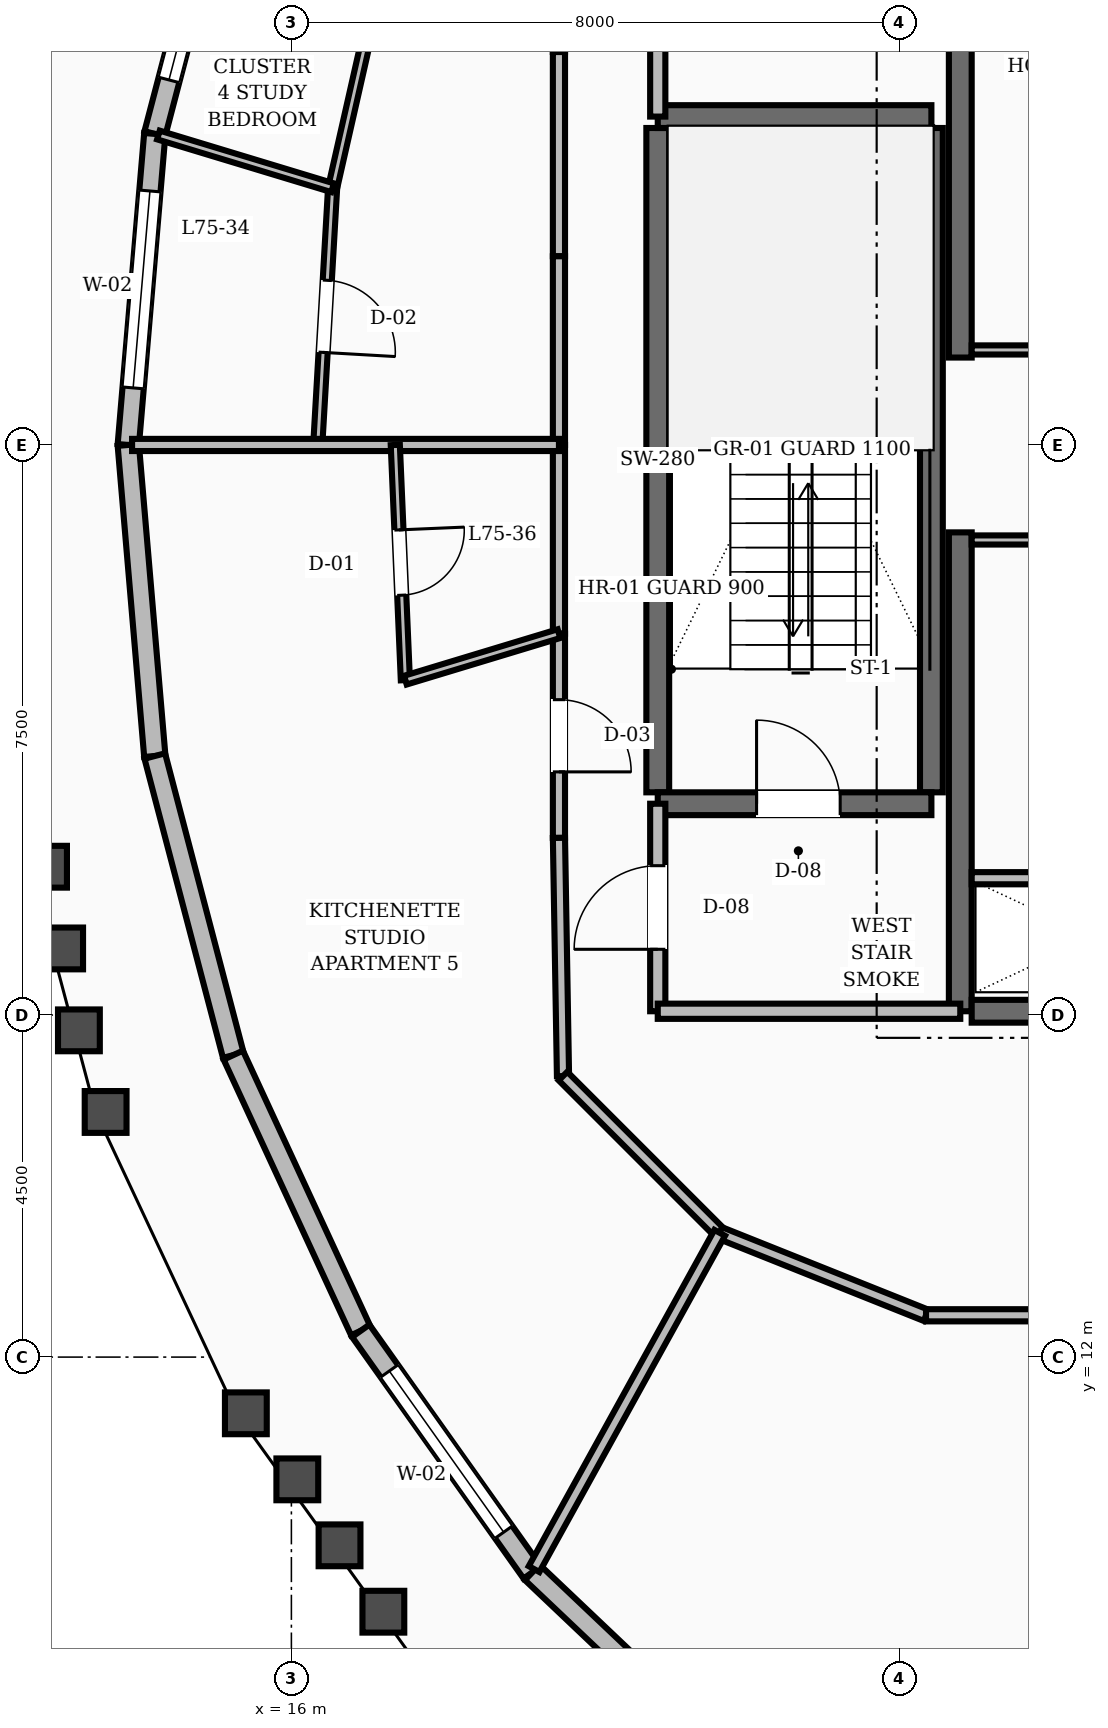
"""IFC4 building model, lengths in metres.
Left out: names, types, materials, properties, quantities, classifications, styles, units other than length and angle.
Written with IfcOpenShell. Run it as: python <this file> out.ifc"""

import sys

from ifc_helpers import new_model, si_unit, direction, frame, frame_2d, origin, place, context, subcontext, project, spatial, rectangle, extrude, element, fill, save


model = new_model("IFC4")
c1 = context("Model", 3, precision=1e-05, world=origin(), true_north=direction((0.0, 1.0)))
c2 = subcontext(c1, "Body", "Model", "MODEL_VIEW")
j1 = project(units=[si_unit("LENGTHUNIT", "METRE"), si_unit("PLANEANGLEUNIT", "RADIAN")], contexts=[c1])
p1 = place(None, origin())
s1 = spatial("IfcSite", under=j1, at=p1, CompositionType="ELEMENT")
p2 = place(p1, origin())
s2 = spatial("IfcBuilding", under=s1, at=p2, CompositionType="ELEMENT")
p3 = place(p2, frame((0.0, 0.0, 286.8)))
s3 = spatial("IfcBuildingStorey", under=s2, at=p3, CompositionType="ELEMENT", Elevation=286.8)
for number, where, z_axis, x_axis in (
    (1, (24.8, 16.55, 0.0), (0.0, 0.0, 1.0), (0.0, 1.0, 0.0)),
    (2, (24.8, 25.15, 0.0), (0.0, 0.0, 1.0), (0.0, 1.0, 0.0)),
):
    element("IfcWall", number, at=place(p3, frame(where, z_axis=z_axis, x_axis=x_axis)), inside=s3, PredefinedType="SHEAR", context=c2, shape_type="SweptSolid", body=[
        extrude(rectangle(XDim=6.3, YDim=0.3, at=frame_2d((3.15, 0.0))), origin(), (0.0, 0.0, 1.0), 3.6),
    ])
p4 = place(p3, frame((24.95, 16.55, 0.0), z_axis=(0.0, 0.0, 1.0), x_axis=(1.0, 0.0, 0.0)))
e3 = element("IfcWall", 3, at=p4, inside=s3, PredefinedType="SHEAR", context=c2, shape_type="SweptSolid", body=[
    extrude(rectangle(XDim=3.25, YDim=0.3, at=frame_2d((1.625, 0.0))), origin(), (0.0, 0.0, 1.0), 3.6),
])
for number, where, z_axis, x_axis in (
    (4, (20.82, 19.43, 0.0), (0.0, 0.0, 1.0), (0.0, 1.0, 0.0)),
    (5, (24.42, 19.43, 0.0), (0.0, 0.0, 1.0), (0.0, 1.0, 0.0)),
):
    element("IfcWall", number, at=place(p3, frame(where, z_axis=z_axis, x_axis=x_axis)), inside=s3, PredefinedType="SHEAR", context=c2, shape_type="SweptSolid", body=[
        extrude(rectangle(XDim=8.74, YDim=0.3, at=frame_2d((4.37, 0.0))), origin(), (0.0, 0.0, 1.0), 3.6),
    ])
p5 = place(p3, frame((20.82, 19.28, 0.0), z_axis=(0.0, 0.0, 1.0), x_axis=(1.0, 0.0, 0.0)))
e6 = element("IfcWall", 6, at=p5, inside=s3, PredefinedType="SHEAR", context=c2, shape_type="SweptSolid", body=[
    extrude(rectangle(XDim=3.6, YDim=0.3, at=frame_2d((1.8, 0.0))), origin(), (0.0, 0.0, 1.0), 3.6),
])
p6 = place(p5, frame((1.3, 0.0, 0.0)))
e7 = element("IfcOpeningElement", 7, at=p6, cuts=e6, PredefinedType="OPENING", context=c2, shape_type="SweptSolid", body=[
    extrude(rectangle(XDim=1.1, YDim=2.1, at=frame_2d((0.55, 1.05))), frame((0.0, 0.16, 0.0), z_axis=(0.0, -1.0, 0.0), x_axis=(1.0, 0.0, 0.0)), (0.0, 0.0, 1.0), 0.32),
])
p7 = place(p3, frame((20.82, 28.32, 0.0), z_axis=(0.0, 0.0, 1.0), x_axis=(1.0, 0.0, 0.0)))
e8 = element("IfcWall", 8, at=p7, inside=s3, PredefinedType="SHEAR", context=c2, shape_type="SweptSolid", body=[
    extrude(rectangle(XDim=3.6, YDim=0.3, at=frame_2d((1.8, 0.0))), origin(), (0.0, 0.0, 1.0), 3.6),
])
p8 = place(p3, frame((15.235, 32.027, 0.0), z_axis=(0.0, 0.0, 1.0), x_axis=(-0.253787245117, -0.967260065451, 0.0)))
e9 = element("IfcWall", 9, at=p8, inside=s3, PredefinedType="STANDARD", context=c2, shape_type="SweptSolid", body=[
    extrude(rectangle(XDim=4.068, YDim=0.28, at=frame_2d((2.034, 0.0))), origin(), (0.0, 0.0, 1.0), 2.88),
])
p9 = place(p8, frame((0.734, 0.0, 0.8)))
e10 = element("IfcOpeningElement", 10, at=p9, cuts=e9, PredefinedType="OPENING", context=c2, shape_type="SweptSolid", body=[
    extrude(rectangle(XDim=2.6, YDim=1.65, at=frame_2d((1.3, 0.825))), frame((0.0, 0.15, 0.0), z_axis=(0.0, -1.0, 0.0), x_axis=(1.0, 0.0, 0.0)), (0.0, 0.0, 1.0), 0.3),
])
p10 = place(p3, frame((14.203, 28.092, 0.0), z_axis=(0.0, 0.0, 1.0), x_axis=(-0.084944229557, -0.996385707377, 0.0)))
e11 = element("IfcWall", 11, at=p10, inside=s3, PredefinedType="STANDARD", context=c2, shape_type="SweptSolid", body=[
    extrude(rectangle(XDim=4.107, YDim=0.28, at=frame_2d((2.054, 0.0))), origin(), (0.0, 0.0, 1.0), 2.88),
])
p11 = place(p10, frame((0.754, 0.0, 0.8)))
e12 = element("IfcOpeningElement", 12, at=p11, cuts=e11, PredefinedType="OPENING", context=c2, shape_type="SweptSolid", body=[
    extrude(rectangle(XDim=2.6, YDim=1.65, at=frame_2d((1.3, 0.825))), frame((0.0, 0.15, 0.0), z_axis=(0.0, -1.0, 0.0), x_axis=(1.0, 0.0, 0.0)), (0.0, 0.0, 1.0), 0.3),
])
p12 = place(p3, frame((13.854, 24.0, 0.0), z_axis=(0.0, 0.0, 1.0), x_axis=(0.084944229557, -0.996385707377, 0.0)))
e13 = element("IfcWall", 13, at=p12, inside=s3, PredefinedType="STANDARD", context=c2, shape_type="SweptSolid", body=[
    extrude(rectangle(XDim=4.107, YDim=0.28, at=frame_2d((2.054, 0.0))), origin(), (0.0, 0.0, 1.0), 2.88),
])
p13 = place(p3, frame((14.203, 19.908, 0.0), z_axis=(0.0, 0.0, 1.0), x_axis=(0.253787245117, -0.967260065451, 0.0)))
e14 = element("IfcWall", 14, at=p13, inside=s3, PredefinedType="STANDARD", context=c2, shape_type="SweptSolid", body=[
    extrude(rectangle(XDim=4.068, YDim=0.28, at=frame_2d((2.034, 0.0))), origin(), (0.0, 0.0, 1.0), 2.88),
])
p14 = place(p3, frame((15.235, 15.973, 0.0), z_axis=(0.0, 0.0, 1.0), x_axis=(0.41967808517, -0.90767301647, 0.0)))
e15 = element("IfcWall", 15, at=p14, inside=s3, PredefinedType="STANDARD", context=c2, shape_type="SweptSolid", body=[
    extrude(rectangle(XDim=3.995, YDim=0.28, at=frame_2d((1.998, 0.0))), origin(), (0.0, 0.0, 1.0), 2.88),
])
p15 = place(p3, frame((16.912, 12.346, 0.0), z_axis=(0.0, 0.0, 1.0), x_axis=(0.578913591695, -0.815388897, 0.0)))
e16 = element("IfcWall", 16, at=p15, inside=s3, PredefinedType="STANDARD", context=c2, shape_type="SweptSolid", body=[
    extrude(rectangle(XDim=3.898, YDim=0.28, at=frame_2d((1.949, 0.0))), origin(), (0.0, 0.0, 1.0), 2.88),
])
p16 = place(p15, frame((0.649, 0.0, 0.8)))
e17 = element("IfcOpeningElement", 17, at=p16, cuts=e16, PredefinedType="OPENING", context=c2, shape_type="SweptSolid", body=[
    extrude(rectangle(XDim=2.6, YDim=1.65, at=frame_2d((1.3, 0.825))), frame((0.0, 0.15, 0.0), z_axis=(0.0, -1.0, 0.0), x_axis=(1.0, 0.0, 0.0)), (0.0, 0.0, 1.0), 0.3),
])
p17 = place(p3, frame((19.169, 9.167, 0.0), z_axis=(0.0, 0.0, 1.0), x_axis=(0.725476892889, -0.688246524063, 0.0)))
e18 = element("IfcWall", 18, at=p17, inside=s3, PredefinedType="STANDARD", context=c2, shape_type="SweptSolid", body=[
    extrude(rectangle(XDim=3.79, YDim=0.28, at=frame_2d((1.895, 0.0))), origin(), (0.0, 0.0, 1.0), 2.88),
])
p18 = place(p3, frame((20.82, 16.55, 0.0), z_axis=(0.0, 0.0, 1.0), x_axis=(0.0, 1.0, 0.0)))
e19 = element("IfcWall", 19, at=p18, inside=s3, PredefinedType="SOLIDWALL", context=c2, shape_type="SweptSolid", body=[
    extrude(rectangle(XDim=2.73, YDim=0.2, at=frame_2d((1.365, 0.0))), origin(), (0.0, 0.0, 1.0), 2.87),
])
p19 = place(p18, frame((0.815, 0.0, 0.0)))
e20 = element("IfcOpeningElement", 20, at=p19, cuts=e19, PredefinedType="OPENING", context=c2, shape_type="SweptSolid", body=[
    extrude(rectangle(XDim=1.1, YDim=2.1, at=frame_2d((0.55, 1.05))), frame((0.0, 0.11, 0.0), z_axis=(0.0, -1.0, 0.0), x_axis=(1.0, 0.0, 0.0)), (0.0, 0.0, 1.0), 0.22),
])
p20 = place(p3, frame((20.82, 16.55, 0.0), z_axis=(0.0, 0.0, 1.0), x_axis=(1.0, 0.0, 0.0)))
e21 = element("IfcWall", 21, at=p20, inside=s3, PredefinedType="SOLIDWALL", context=c2, shape_type="SweptSolid", body=[
    extrude(rectangle(XDim=3.98, YDim=0.2, at=frame_2d((1.99, 0.0))), origin(), (0.0, 0.0, 1.0), 2.87),
])
p21 = place(p3, frame((20.82, 28.32, 0.0), z_axis=(0.0, 0.0, 1.0), x_axis=(0.0, 1.0, 0.0)))
e22 = element("IfcWall", 22, at=p21, inside=s3, PredefinedType="SOLIDWALL", context=c2, shape_type="SweptSolid", body=[
    extrude(rectangle(XDim=3.13, YDim=0.2, at=frame_2d((1.565, 0.0))), origin(), (0.0, 0.0, 1.0), 2.87),
])
p22 = place(p21, frame((1.09, 0.0, 0.0)))
e23 = element("IfcOpeningElement", 23, at=p22, cuts=e22, PredefinedType="OPENING", context=c2, shape_type="SweptSolid", body=[
    extrude(rectangle(XDim=0.95, YDim=2.1, at=frame_2d((0.475, 1.05))), frame((0.0, 0.11, 0.0), z_axis=(0.0, -1.0, 0.0), x_axis=(1.0, 0.0, 0.0)), (0.0, 0.0, 1.0), 0.22),
])
p23 = place(p3, frame((24.95, 18.3, 0.0), z_axis=(0.0, 0.0, 1.0), x_axis=(1.0, 0.0, 0.0)))
e24 = element("IfcWall", 24, at=p23, inside=s3, PredefinedType="SOLIDWALL", context=c2, shape_type="SweptSolid", body=[
    extrude(rectangle(XDim=3.2, YDim=0.16, at=frame_2d((1.6, 0.0))), origin(), (0.0, 0.0, 1.0), 2.87),
])
p24 = place(p3, frame((24.95, 25.25, 0.0), z_axis=(0.0, 0.0, 1.0), x_axis=(1.0, 0.0, 0.0)))
e25 = element("IfcWall", 25, at=p24, inside=s3, PredefinedType="PARTITIONING", context=c2, shape_type="SweptSolid", body=[
    extrude(rectangle(XDim=3.2, YDim=0.12, at=frame_2d((1.6, 0.0))), origin(), (0.0, 0.0, 1.0), 2.87),
])
p25 = place(p24, frame((1.125, 0.0, 0.0)))
e26 = element("IfcOpeningElement", 26, at=p25, cuts=e25, PredefinedType="OPENING", context=c2, shape_type="SweptSolid", body=[
    extrude(rectangle(XDim=0.95, YDim=2.1, at=frame_2d((0.475, 1.05))), frame((0.0, 0.07, 0.0), z_axis=(0.0, -1.0, 0.0), x_axis=(1.0, 0.0, 0.0)), (0.0, 0.0, 1.0), 0.14),
])
p26 = place(p3, frame((24.95, 22.75, 0.0), z_axis=(0.0, 0.0, 1.0), x_axis=(1.0, 0.0, 0.0)))
e27 = element("IfcWall", 27, at=p26, inside=s3, PredefinedType="PARTITIONING", context=c2, shape_type="SweptSolid", body=[
    extrude(rectangle(XDim=3.2, YDim=0.12, at=frame_2d((1.6, 0.0))), origin(), (0.0, 0.0, 1.0), 2.87),
])
p27 = place(p26, frame((1.125, 0.0, 0.0)))
e28 = element("IfcOpeningElement", 28, at=p27, cuts=e27, PredefinedType="OPENING", context=c2, shape_type="SweptSolid", body=[
    extrude(rectangle(XDim=0.95, YDim=2.1, at=frame_2d((0.475, 1.05))), frame((0.0, 0.07, 0.0), z_axis=(0.0, -1.0, 0.0), x_axis=(1.0, 0.0, 0.0)), (0.0, 0.0, 1.0), 0.14),
])
p28 = place(p3, frame((19.573, 32.303, 0.0), z_axis=(0.0, 0.0, 1.0), x_axis=(-0.016981035134, -0.999855811828, 0.0)))
e29 = element("IfcWall", 29, at=p28, inside=s3, PredefinedType="SOLIDWALL", context=c2, shape_type="SweptSolid", body=[
    extrude(rectangle(XDim=3.134, YDim=0.16, at=frame_2d((1.567, 0.0))), origin(), (0.0, 0.0, 1.0), 2.87),
])
p29 = place(p3, frame((19.52, 29.169, 0.0), z_axis=(0.0, 0.0, 1.0), x_axis=(0.0, -1.0, 0.0)))
e30 = element("IfcWall", 30, at=p29, inside=s3, PredefinedType="SOLIDWALL", context=c2, shape_type="SweptSolid", body=[
    extrude(rectangle(XDim=2.687, YDim=0.16, at=frame_2d((1.344, 0.0))), origin(), (0.0, 0.0, 1.0), 2.87),
])
for number, where, z_axis, x_axis in (
    (31, (19.52, 26.482, 0.0), (0.0, 0.0, 1.0), (0.0, -1.0, 0.0)),
    (32, (19.52, 24.0, 0.0), (0.0, 0.0, 1.0), (0.0, -1.0, 0.0)),
):
    element("IfcWall", number, at=place(p3, frame(where, z_axis=z_axis, x_axis=x_axis)), inside=s3, PredefinedType="SOLIDWALL", context=c2, shape_type="SweptSolid", body=[
        extrude(rectangle(XDim=2.482, YDim=0.16, at=frame_2d((1.241, 0.0))), origin(), (0.0, 0.0, 1.0), 2.87),
    ])
p30 = place(p3, frame((19.52, 21.518, 0.0), z_axis=(0.0, 0.0, 1.0), x_axis=(0.0, -1.0, 0.0)))
e33 = element("IfcWall", 33, at=p30, inside=s3, PredefinedType="SOLIDWALL", context=c2, shape_type="SweptSolid", body=[
    extrude(rectangle(XDim=2.687, YDim=0.16, at=frame_2d((1.344, 0.0))), origin(), (0.0, 0.0, 1.0), 2.87),
])
p31 = place(p30, frame((0.868, 0.0, 0.0)))
e34 = element("IfcOpeningElement", 34, at=p31, cuts=e33, PredefinedType="OPENING", context=c2, shape_type="SweptSolid", body=[
    extrude(rectangle(XDim=0.95, YDim=2.1, at=frame_2d((0.475, 1.05))), frame((0.0, 0.09, 0.0), z_axis=(0.0, -1.0, 0.0), x_axis=(1.0, 0.0, 0.0)), (0.0, 0.0, 1.0), 0.18),
])
p32 = place(p3, frame((19.52, 18.831, 0.0), z_axis=(0.0, 0.0, 1.0), x_axis=(0.016981035134, -0.999855811828, 0.0)))
e35 = element("IfcWall", 35, at=p32, inside=s3, PredefinedType="SOLIDWALL", context=c2, shape_type="SweptSolid", body=[
    extrude(rectangle(XDim=3.134, YDim=0.16, at=frame_2d((1.567, 0.0))), origin(), (0.0, 0.0, 1.0), 2.87),
])
p33 = place(p3, frame((19.573, 15.697, 0.0), z_axis=(0.0, 0.0, 1.0), x_axis=(0.707106781187, -0.707106781187, 0.0)))
e36 = element("IfcWall", 36, at=p33, inside=s3, PredefinedType="SOLIDWALL", context=c2, shape_type="SweptSolid", body=[
    extrude(rectangle(XDim=2.916, YDim=0.16, at=frame_2d((1.458, 0.0))), origin(), (0.0, 0.0, 1.0), 2.87),
])
p34 = place(p3, frame((21.635, 13.635, 0.0), z_axis=(0.0, 0.0, 1.0), x_axis=(0.92856882165, -0.371160266542, 0.0)))
e37 = element("IfcWall", 37, at=p34, inside=s3, PredefinedType="SOLIDWALL", context=c2, shape_type="SweptSolid", body=[
    extrude(rectangle(XDim=2.923, YDim=0.16, at=frame_2d((1.461, 0.0))), origin(), (0.0, 0.0, 1.0), 2.87),
])
p35 = place(p3, frame((24.349, 12.55, 0.0), z_axis=(0.0, 0.0, 1.0), x_axis=(1.0, 0.0, 0.0)))
e38 = element("IfcWall", 38, at=p35, inside=s3, PredefinedType="SOLIDWALL", context=c2, shape_type="SweptSolid", body=[
    extrude(rectangle(XDim=2.908, YDim=0.16, at=frame_2d((1.454, 0.0))), origin(), (0.0, 0.0, 1.0), 2.87),
])
p36 = place(p3, frame((18.083, 34.18, 0.0), z_axis=(0.0, 0.0, 1.0), x_axis=(-0.22107591462, -0.975256602118, 0.0)))
e39 = element("IfcWall", 39, at=p36, inside=s3, PredefinedType="PARTITIONING", context=c2, shape_type="SweptSolid", body=[
    extrude(rectangle(XDim=6.968, YDim=0.12, at=frame_2d((3.484, 0.0))), origin(), (0.0, 0.0, 1.0), 2.87),
])
p37 = place(p36, frame((3.009, 0.0, 0.0)))
e40 = element("IfcOpeningElement", 40, at=p37, cuts=e39, PredefinedType="OPENING", context=c2, shape_type="SweptSolid", body=[
    extrude(rectangle(XDim=0.95, YDim=2.1, at=frame_2d((0.475, 1.05))), frame((0.0, 0.07, 0.0), z_axis=(0.0, -1.0, 0.0), x_axis=(1.0, 0.0, 0.0)), (0.0, 0.0, 1.0), 0.14),
])
p38 = place(p3, frame((16.542, 27.384, 0.0), z_axis=(0.0, 0.0, 1.0), x_axis=(-0.057624147088, -0.998338348293, 0.0)))
e41 = element("IfcWall", 41, at=p38, inside=s3, PredefinedType="PARTITIONING", context=c2, shape_type="SweptSolid", body=[
    extrude(rectangle(XDim=3.389, YDim=0.12, at=frame_2d((1.695, 0.0))), origin(), (0.0, 0.0, 1.0), 2.87),
])
p39 = place(p38, frame((1.22, 0.0, 0.0)))
e42 = element("IfcOpeningElement", 42, at=p39, cuts=e41, PredefinedType="OPENING", context=c2, shape_type="SweptSolid", body=[
    extrude(rectangle(XDim=0.95, YDim=2.1, at=frame_2d((0.475, 1.05))), frame((0.0, 0.07, 0.0), z_axis=(0.0, -1.0, 0.0), x_axis=(1.0, 0.0, 0.0)), (0.0, 0.0, 1.0), 0.14),
])
p40 = place(p3, frame((16.542, 27.384, 0.0), z_axis=(0.0, 0.0, 1.0), x_axis=(-0.957068126057, 0.289863074718, 0.0)))
e43 = element("IfcWall", 43, at=p40, inside=s3, PredefinedType="PARTITIONING", context=c2, shape_type="SweptSolid", body=[
    extrude(rectangle(XDim=2.395, YDim=0.12, at=frame_2d((1.197, 0.0))), origin(), (0.0, 0.0, 1.0), 2.87),
])
p41 = place(p3, frame((19.52, 24.0, 0.0), z_axis=(0.0, 0.0, 1.0), x_axis=(-1.0, 0.0, 0.0)))
e44 = element("IfcWall", 44, at=p41, inside=s3, PredefinedType="SOLIDWALL", context=c2, shape_type="SweptSolid", body=[
    extrude(rectangle(XDim=5.616, YDim=0.16, at=frame_2d((2.808, 0.0))), origin(), (0.0, 0.0, 1.0), 2.87),
])
p42 = place(p3, frame((17.367, 24.0, 0.0), z_axis=(0.0, 0.0, 1.0), x_axis=(0.042804349557, -0.999083473819, 0.0)))
e45 = element("IfcWall", 45, at=p42, inside=s3, PredefinedType="PARTITIONING", context=c2, shape_type="SweptSolid", body=[
    extrude(rectangle(XDim=3.097, YDim=0.12, at=frame_2d((1.549, 0.0))), origin(), (0.0, 0.0, 1.0), 2.87),
])
p43 = place(p42, frame((1.118, 0.0, 0.0)))
e46 = element("IfcOpeningElement", 46, at=p43, cuts=e45, PredefinedType="OPENING", context=c2, shape_type="SweptSolid", body=[
    extrude(rectangle(XDim=0.86, YDim=2.1, at=frame_2d((0.43, 1.05))), frame((0.0, 0.07, 0.0), z_axis=(0.0, -1.0, 0.0), x_axis=(1.0, 0.0, 0.0)), (0.0, 0.0, 1.0), 0.14),
])
p44 = place(p3, frame((19.52, 21.518, 0.0), z_axis=(0.0, 0.0, 1.0), x_axis=(-0.957084686855, -0.289808388746, 0.0)))
e47 = element("IfcWall", 47, at=p44, inside=s3, PredefinedType="PARTITIONING", context=c2, shape_type="SweptSolid", body=[
    extrude(rectangle(XDim=2.111, YDim=0.12, at=frame_2d((1.056, 0.0))), origin(), (0.0, 0.0, 1.0), 2.87),
])
p45 = place(p3, frame((21.635, 13.635, 0.0), z_axis=(0.0, 0.0, 1.0), x_axis=(-0.483253595125, -0.875480418284, 0.0)))
e48 = element("IfcWall", 48, at=p45, inside=s3, PredefinedType="SOLIDWALL", context=c2, shape_type="SweptSolid", body=[
    extrude(rectangle(XDim=5.053, YDim=0.16, at=frame_2d((2.526, 0.0))), origin(), (0.0, 0.0, 1.0), 2.87),
])
p46 = place(p9, origin())
e49 = element("IfcWindow", 49, at=p46, inside=s3, PartitioningType="SINGLE_PANEL", PredefinedType="WINDOW", context=c2, shape_type="SweptSolid", body=[
    extrude(rectangle(XDim=2.6, YDim=1.65, at=frame_2d((1.3, 0.825))), frame((0.0, 0.03, 0.0), z_axis=(0.0, -1.0, 0.0), x_axis=(1.0, 0.0, 0.0)), (0.0, 0.0, 1.0), 0.06),
])
fill(e10, e49)
p47 = place(p11, origin())
e50 = element("IfcWindow", 50, at=p47, inside=s3, PartitioningType="SINGLE_PANEL", PredefinedType="WINDOW", context=c2, shape_type="SweptSolid", body=[
    extrude(rectangle(XDim=2.6, YDim=1.65, at=frame_2d((1.3, 0.825))), frame((0.0, 0.03, 0.0), z_axis=(0.0, -1.0, 0.0), x_axis=(1.0, 0.0, 0.0)), (0.0, 0.0, 1.0), 0.06),
])
fill(e12, e50)
p48 = place(p16, origin())
e51 = element("IfcWindow", 51, at=p48, inside=s3, PartitioningType="SINGLE_PANEL", PredefinedType="WINDOW", context=c2, shape_type="SweptSolid", body=[
    extrude(rectangle(XDim=2.6, YDim=1.65, at=frame_2d((1.3, 0.825))), frame((0.0, 0.03, 0.0), z_axis=(0.0, -1.0, 0.0), x_axis=(1.0, 0.0, 0.0)), (0.0, 0.0, 1.0), 0.06),
])
fill(e17, e51)
p49 = place(p6, origin())
e52 = element("IfcDoor", 52, at=p49, inside=s3, OperationType="SINGLE_SWING_LEFT", PredefinedType="DOOR", context=c2, shape_type="SweptSolid", body=[
    extrude(rectangle(XDim=1.1, YDim=2.1, at=frame_2d((0.55, 1.05))), frame((0.0, 0.025, 0.0), z_axis=(0.0, -1.0, 0.0), x_axis=(1.0, 0.0, 0.0)), (0.0, 0.0, 1.0), 0.05),
])
fill(e7, e52)
p50 = place(p19, origin())
e53 = element("IfcDoor", 53, at=p50, inside=s3, OperationType="SINGLE_SWING_LEFT", PredefinedType="DOOR", context=c2, shape_type="SweptSolid", body=[
    extrude(rectangle(XDim=1.1, YDim=2.1, at=frame_2d((0.55, 1.05))), frame((0.0, 0.025, 0.0), z_axis=(0.0, -1.0, 0.0), x_axis=(1.0, 0.0, 0.0)), (0.0, 0.0, 1.0), 0.05),
])
fill(e20, e53)
p51 = place(p39, origin())
e54 = element("IfcDoor", 54, at=p51, inside=s3, OperationType="SINGLE_SWING_RIGHT", PredefinedType="DOOR", context=c2, shape_type="SweptSolid", body=[
    extrude(rectangle(XDim=0.95, YDim=2.1, at=frame_2d((0.475, 1.05))), frame((0.0, 0.025, 0.0), z_axis=(0.0, -1.0, 0.0), x_axis=(1.0, 0.0, 0.0)), (0.0, 0.0, 1.0), 0.05),
])
fill(e42, e54)
p52 = place(p43, origin())
e55 = element("IfcDoor", 55, at=p52, inside=s3, OperationType="SINGLE_SWING_LEFT", PredefinedType="DOOR", context=c2, shape_type="SweptSolid", body=[
    extrude(rectangle(XDim=0.86, YDim=2.1, at=frame_2d((0.43, 1.05))), frame((0.0, 0.025, 0.0), z_axis=(0.0, -1.0, 0.0), x_axis=(1.0, 0.0, 0.0)), (0.0, 0.0, 1.0), 0.05),
])
fill(e46, e55)
p53 = place(p31, origin())
e56 = element("IfcDoor", 56, at=p53, inside=s3, OperationType="SINGLE_SWING_RIGHT", PredefinedType="DOOR", context=c2, shape_type="SweptSolid", body=[
    extrude(rectangle(XDim=0.95, YDim=2.1, at=frame_2d((0.475, 1.05))), frame((0.0, 0.025, 0.0), z_axis=(0.0, -1.0, 0.0), x_axis=(1.0, 0.0, 0.0)), (0.0, 0.0, 1.0), 0.05),
])
fill(e34, e56)
save(model, sys.argv[1])
